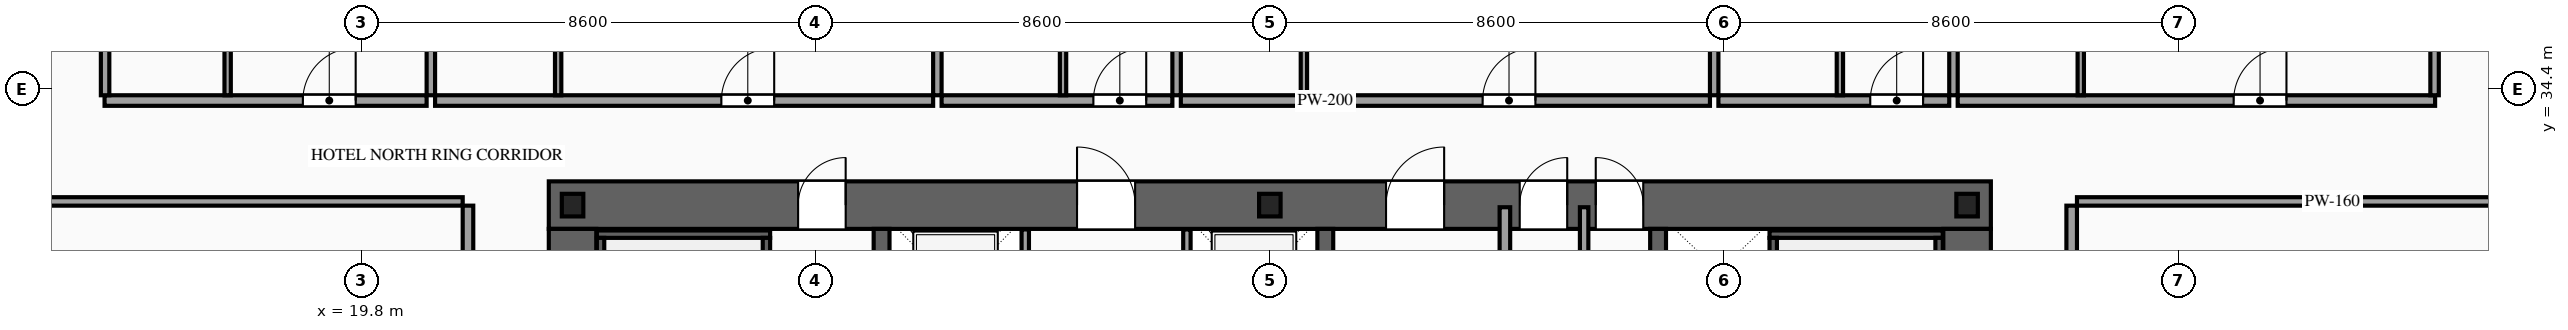
"""IFC4 building model, lengths in metres.
Left out: names, types, materials, properties, quantities, classifications, styles, units other than length and angle.
Written with IfcOpenShell. Run it as: python <this file> out.ifc"""

import sys

from ifc_helpers import new_model, si_unit, direction, frame, frame_2d, origin, origin_2d, place, context, subcontext, project, spatial, rectangle, i_section, extrude, source, transform, mapped, element, fill, save


model = new_model("IFC4")
c1 = context("Model", 3, precision=1e-05, world=origin(), true_north=direction((0.0, 1.0)))
c2 = subcontext(c1, "Body", "Model", "MODEL_VIEW")
j1 = project(units=[si_unit("LENGTHUNIT", "METRE"), si_unit("PLANEANGLEUNIT", "RADIAN")], contexts=[c1])
p1 = place(None, origin())
s1 = spatial("IfcSite", under=j1, at=p1, CompositionType="ELEMENT")
p2 = place(p1, origin())
s2 = spatial("IfcBuilding", under=s1, at=p2, CompositionType="ELEMENT")
p3 = place(p2, frame((0.0, 0.0, 71.2)))
s3 = spatial("IfcBuildingStorey", under=s2, at=p3, CompositionType="ELEMENT", Elevation=71.2)
p4 = place(p3, frame((23.35, 32.2, 0.0), z_axis=(0.0, 0.0, 1.0), x_axis=(1.0, 0.0, 0.0)))
e1 = element("IfcWall", 1, at=p4, inside=s3, PredefinedType="SHEAR", context=c2, shape_type="SweptSolid", body=[
    extrude(rectangle(XDim=27.3, YDim=0.9, at=frame_2d((13.65, 0.0))), origin(), (0.0, 0.0, 1.0), 3.6),
])
p5 = place(p4, frame((4.72, 0.0, 0.0)))
e2 = element("IfcOpeningElement", 2, at=p5, cuts=e1, PredefinedType="OPENING", context=c2, shape_type="SweptSolid", body=[
    extrude(rectangle(XDim=0.9, YDim=2.15, at=frame_2d((0.45, 1.075))), frame((0.0, 0.465, 0.0), z_axis=(0.0, -1.0, 0.0), x_axis=(1.0, 0.0, 0.0)), (0.0, 0.0, 1.0), 0.93),
])
p6 = place(p4, frame((10.0, 0.0, 0.0)))
e3 = element("IfcOpeningElement", 3, at=p6, cuts=e1, PredefinedType="OPENING", context=c2, shape_type="SweptSolid", body=[
    extrude(rectangle(XDim=1.1, YDim=2.2, at=frame_2d((0.55, 1.1))), frame((0.0, 0.465, 0.0), z_axis=(0.0, -1.0, 0.0), x_axis=(1.0, 0.0, 0.0)), (0.0, 0.0, 1.0), 0.93),
])
p7 = place(p4, frame((15.85, 0.0, 0.0)))
e4 = element("IfcOpeningElement", 4, at=p7, cuts=e1, PredefinedType="OPENING", context=c2, shape_type="SweptSolid", body=[
    extrude(rectangle(XDim=1.1, YDim=2.2, at=frame_2d((0.55, 1.1))), frame((0.0, 0.465, 0.0), z_axis=(0.0, -1.0, 0.0), x_axis=(1.0, 0.0, 0.0)), (0.0, 0.0, 1.0), 0.93),
])
p8 = place(p4, frame((18.38, 0.0, 0.0)))
e5 = element("IfcOpeningElement", 5, at=p8, cuts=e1, PredefinedType="OPENING", context=c2, shape_type="SweptSolid", body=[
    extrude(rectangle(XDim=0.9, YDim=2.15, at=frame_2d((0.45, 1.075))), frame((0.0, 0.465, 0.0), z_axis=(0.0, -1.0, 0.0), x_axis=(1.0, 0.0, 0.0)), (0.0, 0.0, 1.0), 0.93),
])
p9 = place(p4, frame((19.82, 0.0, 0.0)))
e6 = element("IfcOpeningElement", 6, at=p9, cuts=e1, PredefinedType="OPENING", context=c2, shape_type="SweptSolid", body=[
    extrude(rectangle(XDim=0.9, YDim=2.15, at=frame_2d((0.45, 1.075))), frame((0.0, 0.465, 0.0), z_axis=(0.0, -1.0, 0.0), x_axis=(1.0, 0.0, 0.0)), (0.0, 0.0, 1.0), 0.93),
])
m1 = source(origin(), c2, "Body", "SweptSolid", [
    extrude(rectangle(XDim=11.9, YDim=0.9, at=frame_2d((5.95, 0.0))), origin(), (0.0, 0.0, 1.0), 3.6),
])
for number, where, z_axis, x_axis in (
    (7, (23.8, 19.85, 0.0), (0.0, 0.0, 1.0), (0.0, 1.0, 0.0)),
    (8, (50.2, 19.85, 0.0), (0.0, 0.0, 1.0), (0.0, 1.0, 0.0)),
):
    element("IfcWall", number, at=place(p3, frame(where, z_axis=z_axis, x_axis=x_axis)), inside=s3, PredefinedType="SHEAR", context=c2, shape_type="MappedRepresentation", body=[
        mapped(m1, transform((0.0, 0.0, 0.0), scale=1.0)),
    ])
m2 = source(origin(), c2, "Body", "SweptSolid", [
    extrude(rectangle(XDim=11.9, YDim=0.3, at=frame_2d((5.95, 0.0))), origin(), (0.0, 0.0, 1.0), 3.6),
])
for number, where, z_axis, x_axis in (
    (9, (29.65, 19.85, 0.0), (0.0, 0.0, 1.0), (0.0, 1.0, 0.0)),
    (10, (38.05, 19.85, 0.0), (0.0, 0.0, 1.0), (0.0, 1.0, 0.0)),
    (11, (44.35, 19.85, 0.0), (0.0, 0.0, 1.0), (0.0, 1.0, 0.0)),
):
    element("IfcWall", number, at=place(p3, frame(where, z_axis=z_axis, x_axis=x_axis)), inside=s3, PredefinedType="SOLIDWALL", context=c2, shape_type="MappedRepresentation", body=[
        mapped(m2, transform((0.0, 0.0, 0.0), scale=1.0)),
    ])
m3 = source(origin(), c2, "Body", "SweptSolid", [
    extrude(i_section(OverallWidth=0.407, OverallDepth=0.428, WebThickness=0.02, FlangeThickness=0.035, at=origin_2d()), origin(), (0.0, 0.0, 1.0), 3.6),
])
for number, where, z_axis, x_axis in (
    (12, (23.8, 32.2, 0.0), (0.0, 0.0, 1.0), (1.0, 0.0, 0.0)),
    (13, (37.0, 32.2, 0.0), (0.0, 0.0, 1.0), (1.0, 0.0, 0.0)),
    (14, (50.2, 32.2, 0.0), (0.0, 0.0, 1.0), (1.0, 0.0, 0.0)),
):
    element("IfcColumn", number, at=place(p3, frame(where, z_axis=z_axis, x_axis=x_axis)), inside=s3, PredefinedType="COLUMN", context=c2, shape_type="MappedRepresentation", body=[
        mapped(m3, transform((0.0, 0.0, 0.0), scale=1.0)),
    ])
p10 = place(p3, frame((32.37, 29.4, 0.0), z_axis=(0.0, 0.0, 1.0), x_axis=(0.0, 1.0, 0.0)))
e15 = element("IfcWall", 15, at=p10, inside=s3, PredefinedType="SOLIDWALL", context=c2, shape_type="SweptSolid", body=[
    extrude(rectangle(XDim=2.34, YDim=0.14, at=frame_2d((1.17, 0.0))), origin(), (0.0, 0.0, 1.0), 3.38),
])
p11 = place(p10, frame((0.62, 0.0, 0.0)))
e16 = element("IfcOpeningElement", 16, at=p11, cuts=e15, PredefinedType="OPENING", context=c2, shape_type="SweptSolid", body=[
    extrude(rectangle(XDim=1.1, YDim=2.2, at=frame_2d((0.55, 1.1))), frame((0.0, 0.085, 0.0), z_axis=(0.0, -1.0, 0.0), x_axis=(1.0, 0.0, 0.0)), (0.0, 0.0, 1.0), 0.17),
])
p12 = place(p3, frame((35.43, 29.4, 0.0), z_axis=(0.0, 0.0, 1.0), x_axis=(0.0, 1.0, 0.0)))
e17 = element("IfcWall", 17, at=p12, inside=s3, PredefinedType="SOLIDWALL", context=c2, shape_type="SweptSolid", body=[
    extrude(rectangle(XDim=2.34, YDim=0.14, at=frame_2d((1.17, 0.0))), origin(), (0.0, 0.0, 1.0), 3.38),
])
p13 = place(p12, frame((0.62, 0.0, 0.0)))
e18 = element("IfcOpeningElement", 18, at=p13, cuts=e17, PredefinedType="OPENING", context=c2, shape_type="SweptSolid", body=[
    extrude(rectangle(XDim=1.1, YDim=2.2, at=frame_2d((0.55, 1.1))), frame((0.0, 0.085, 0.0), z_axis=(0.0, -1.0, 0.0), x_axis=(1.0, 0.0, 0.0)), (0.0, 0.0, 1.0), 0.17),
])
m4 = source(origin(), c2, "Body", "SweptSolid", [
    extrude(rectangle(XDim=3.28, YDim=0.14, at=frame_2d((1.64, 0.0))), origin(), (0.0, 0.0, 1.0), 3.38),
])
p14 = place(p3, frame((24.26, 31.65, 0.0), z_axis=(0.0, 0.0, 1.0), x_axis=(1.0, 0.0, 0.0)))
e19 = element("IfcWall", 19, at=p14, inside=s3, PredefinedType="SOLIDWALL", context=c2, shape_type="MappedRepresentation", body=[
    mapped(m4, transform((0.0, 0.0, 0.0), scale=1.0)),
])
m5 = source(origin(), c2, "Body", "SweptSolid", [
    extrude(rectangle(XDim=8.94, YDim=0.14, at=frame_2d((4.47, 0.0))), origin(), (0.0, 0.0, 1.0), 3.38),
])
for number, where, z_axis, x_axis in (
    (20, (24.33, 22.64, 0.0), (0.0, 0.0, 1.0), (0.0, 1.0, 0.0)),
    (21, (27.47, 22.64, 0.0), (0.0, 0.0, 1.0), (0.0, 1.0, 0.0)),
):
    element("IfcWall", number, at=place(p3, frame(where, z_axis=z_axis, x_axis=x_axis)), inside=s3, PredefinedType="SOLIDWALL", context=c2, shape_type="MappedRepresentation", body=[
        mapped(m5, transform((0.0, 0.0, 0.0), scale=1.0)),
    ])
p15 = place(p3, frame((46.46, 31.65, 0.0), z_axis=(0.0, 0.0, 1.0), x_axis=(1.0, 0.0, 0.0)))
e22 = element("IfcWall", 22, at=p15, inside=s3, PredefinedType="SOLIDWALL", context=c2, shape_type="MappedRepresentation", body=[
    mapped(m4, transform((0.0, 0.0, 0.0), scale=1.0)),
])
for number, where, z_axis, x_axis in (
    (23, (46.53, 22.64, 0.0), (0.0, 0.0, 1.0), (0.0, 1.0, 0.0)),
    (24, (49.67, 22.64, 0.0), (0.0, 0.0, 1.0), (0.0, 1.0, 0.0)),
):
    element("IfcWall", number, at=place(p3, frame(where, z_axis=z_axis, x_axis=x_axis)), inside=s3, PredefinedType="SOLIDWALL", context=c2, shape_type="MappedRepresentation", body=[
        mapped(m5, transform((0.0, 0.0, 0.0), scale=1.0)),
    ])
m6 = source(origin(), c2, "Body", "SweptSolid", [
    extrude(rectangle(XDim=5.96, YDim=0.2, at=frame_2d((2.98, 0.0))), origin(), (0.0, 0.0, 1.0), 3.38),
])
p16 = place(p3, frame((41.45, 26.2, 0.0), z_axis=(0.0, 0.0, 1.0), x_axis=(0.0, 1.0, 0.0)))
e25 = element("IfcWall", 25, at=p16, inside=s3, PredefinedType="PARTITIONING", context=c2, shape_type="MappedRepresentation", body=[
    mapped(m6, transform((0.0, 0.0, 0.0), scale=1.0)),
])
m7 = source(origin(), c2, "Body", "SweptSolid", [
    extrude(rectangle(XDim=5.96, YDim=0.16, at=frame_2d((2.98, 0.0))), origin(), (0.0, 0.0, 1.0), 3.38),
])
p17 = place(p3, frame((42.95, 26.2, 0.0), z_axis=(0.0, 0.0, 1.0), x_axis=(0.0, 1.0, 0.0)))
e26 = element("IfcWall", 26, at=p17, inside=s3, PredefinedType="PARTITIONING", context=c2, shape_type="MappedRepresentation", body=[
    mapped(m7, transform((0.0, 0.0, 0.0), scale=1.0)),
])
p18 = place(p3, frame((14.94, 34.18, 0.0), z_axis=(0.0, 0.0, 1.0), x_axis=(1.0, 0.0, 0.0)))
e27 = element("IfcWall", 27, at=p18, inside=s3, PredefinedType="PARTITIONING", context=c2, shape_type="SweptSolid", body=[
    extrude(rectangle(XDim=6.097, YDim=0.2, at=frame_2d((3.049, 0.0))), origin(), (0.0, 0.0, 1.0), 3.38),
])
p19 = place(p18, frame((3.754, 0.0, 0.0)))
e28 = element("IfcOpeningElement", 28, at=p19, cuts=e27, PredefinedType="OPENING", context=c2, shape_type="SweptSolid", body=[
    extrude(rectangle(XDim=1.0, YDim=2.2, at=frame_2d((0.5, 1.1))), frame((0.0, 0.115, 0.0), z_axis=(0.0, -1.0, 0.0), x_axis=(1.0, 0.0, 0.0)), (0.0, 0.0, 1.0), 0.23),
])
m8 = source(origin(), c2, "Body", "SweptSolid", [
    extrude(rectangle(XDim=16.47, YDim=0.16, at=frame_2d((8.235, 0.0))), origin(), (0.0, 0.0, 1.0), 3.38),
])
p20 = place(p3, frame((21.117, 34.28, 0.0), z_axis=(0.0, 0.0, 1.0), x_axis=(0.0, 1.0, 0.0)))
e29 = element("IfcWall", 29, at=p20, inside=s3, PredefinedType="PARTITIONING", context=c2, shape_type="MappedRepresentation", body=[
    mapped(m8, transform((0.0, 0.0, 0.0), scale=1.0)),
])
m9 = source(origin(), c2, "Body", "SweptSolid", [
    extrude(rectangle(XDim=2.42, YDim=0.12, at=frame_2d((1.21, 0.0))), origin(), (0.0, 0.0, 1.0), 3.38),
])
p21 = place(p3, frame((17.27, 34.28, 0.0), z_axis=(0.0, 0.0, 1.0), x_axis=(0.0, 1.0, 0.0)))
e30 = element("IfcWall", 30, at=p21, inside=s3, PredefinedType="PARTITIONING", context=c2, shape_type="MappedRepresentation", body=[
    mapped(m9, transform((0.0, 0.0, 0.0), scale=1.0)),
])
p22 = place(p3, frame((21.197, 34.18, 0.0), z_axis=(0.0, 0.0, 1.0), x_axis=(1.0, 0.0, 0.0)))
e31 = element("IfcWall", 31, at=p22, inside=s3, PredefinedType="PARTITIONING", context=c2, shape_type="SweptSolid", body=[
    extrude(rectangle(XDim=9.429, YDim=0.2, at=frame_2d((4.714, 0.0))), origin(), (0.0, 0.0, 1.0), 3.38),
])
p23 = place(p22, frame((5.42, 0.0, 0.0)))
e32 = element("IfcOpeningElement", 32, at=p23, cuts=e31, PredefinedType="OPENING", context=c2, shape_type="SweptSolid", body=[
    extrude(rectangle(XDim=1.0, YDim=2.2, at=frame_2d((0.5, 1.1))), frame((0.0, 0.115, 0.0), z_axis=(0.0, -1.0, 0.0), x_axis=(1.0, 0.0, 0.0)), (0.0, 0.0, 1.0), 0.23),
])
p24 = place(p3, frame((30.706, 34.28, 0.0), z_axis=(0.0, 0.0, 1.0), x_axis=(0.0, 1.0, 0.0)))
e33 = element("IfcWall", 33, at=p24, inside=s3, PredefinedType="PARTITIONING", context=c2, shape_type="MappedRepresentation", body=[
    mapped(m8, transform((0.0, 0.0, 0.0), scale=1.0)),
])
p25 = place(p3, frame((23.527, 34.28, 0.0), z_axis=(0.0, 0.0, 1.0), x_axis=(0.0, 1.0, 0.0)))
e34 = element("IfcWall", 34, at=p25, inside=s3, PredefinedType="PARTITIONING", context=c2, shape_type="MappedRepresentation", body=[
    mapped(m9, transform((0.0, 0.0, 0.0), scale=1.0)),
])
p26 = place(p3, frame((30.786, 34.18, 0.0), z_axis=(0.0, 0.0, 1.0), x_axis=(1.0, 0.0, 0.0)))
e35 = element("IfcWall", 35, at=p26, inside=s3, PredefinedType="PARTITIONING", context=c2, shape_type="SweptSolid", body=[
    extrude(rectangle(XDim=4.369, YDim=0.2, at=frame_2d((2.185, 0.0))), origin(), (0.0, 0.0, 1.0), 3.38),
])
p27 = place(p26, frame((2.874, 0.0, 0.0)))
e36 = element("IfcOpeningElement", 36, at=p27, cuts=e35, PredefinedType="OPENING", context=c2, shape_type="SweptSolid", body=[
    extrude(rectangle(XDim=1.0, YDim=2.2, at=frame_2d((0.5, 1.1))), frame((0.0, 0.115, 0.0), z_axis=(0.0, -1.0, 0.0), x_axis=(1.0, 0.0, 0.0)), (0.0, 0.0, 1.0), 0.23),
])
p28 = place(p3, frame((35.235, 34.28, 0.0), z_axis=(0.0, 0.0, 1.0), x_axis=(0.0, 1.0, 0.0)))
e37 = element("IfcWall", 37, at=p28, inside=s3, PredefinedType="PARTITIONING", context=c2, shape_type="MappedRepresentation", body=[
    mapped(m8, transform((0.0, 0.0, 0.0), scale=1.0)),
])
p29 = place(p3, frame((33.085, 34.28, 0.0), z_axis=(0.0, 0.0, 1.0), x_axis=(0.0, 1.0, 0.0)))
e38 = element("IfcWall", 38, at=p29, inside=s3, PredefinedType="PARTITIONING", context=c2, shape_type="MappedRepresentation", body=[
    mapped(m9, transform((0.0, 0.0, 0.0), scale=1.0)),
])
p30 = place(p3, frame((35.315, 34.18, 0.0), z_axis=(0.0, 0.0, 1.0), x_axis=(1.0, 0.0, 0.0)))
e39 = element("IfcWall", 39, at=p30, inside=s3, PredefinedType="PARTITIONING", context=c2, shape_type="SweptSolid", body=[
    extrude(rectangle(XDim=10.017, YDim=0.2, at=frame_2d((5.009, 0.0))), origin(), (0.0, 0.0, 1.0), 3.38),
])
p31 = place(p30, frame((5.713, 0.0, 0.0)))
e40 = element("IfcOpeningElement", 40, at=p31, cuts=e39, PredefinedType="OPENING", context=c2, shape_type="SweptSolid", body=[
    extrude(rectangle(XDim=1.0, YDim=2.2, at=frame_2d((0.5, 1.1))), frame((0.0, 0.115, 0.0), z_axis=(0.0, -1.0, 0.0), x_axis=(1.0, 0.0, 0.0)), (0.0, 0.0, 1.0), 0.23),
])
p32 = place(p3, frame((45.412, 34.28, 0.0), z_axis=(0.0, 0.0, 1.0), x_axis=(0.0, 1.0, 0.0)))
e41 = element("IfcWall", 41, at=p32, inside=s3, PredefinedType="PARTITIONING", context=c2, shape_type="MappedRepresentation", body=[
    mapped(m8, transform((0.0, 0.0, 0.0), scale=1.0)),
])
p33 = place(p3, frame((37.645, 34.28, 0.0), z_axis=(0.0, 0.0, 1.0), x_axis=(0.0, 1.0, 0.0)))
e42 = element("IfcWall", 42, at=p33, inside=s3, PredefinedType="PARTITIONING", context=c2, shape_type="MappedRepresentation", body=[
    mapped(m9, transform((0.0, 0.0, 0.0), scale=1.0)),
])
p34 = place(p3, frame((45.492, 34.18, 0.0), z_axis=(0.0, 0.0, 1.0), x_axis=(1.0, 0.0, 0.0)))
e43 = element("IfcWall", 43, at=p34, inside=s3, PredefinedType="PARTITIONING", context=c2, shape_type="SweptSolid", body=[
    extrude(rectangle(XDim=4.37, YDim=0.2, at=frame_2d((2.185, 0.0))), origin(), (0.0, 0.0, 1.0), 3.38),
])
p35 = place(p34, frame((2.875, 0.0, 0.0)))
e44 = element("IfcOpeningElement", 44, at=p35, cuts=e43, PredefinedType="OPENING", context=c2, shape_type="SweptSolid", body=[
    extrude(rectangle(XDim=1.0, YDim=2.2, at=frame_2d((0.5, 1.1))), frame((0.0, 0.115, 0.0), z_axis=(0.0, -1.0, 0.0), x_axis=(1.0, 0.0, 0.0)), (0.0, 0.0, 1.0), 0.23),
])
p36 = place(p3, frame((49.942, 34.28, 0.0), z_axis=(0.0, 0.0, 1.0), x_axis=(0.0, 1.0, 0.0)))
e45 = element("IfcWall", 45, at=p36, inside=s3, PredefinedType="PARTITIONING", context=c2, shape_type="MappedRepresentation", body=[
    mapped(m8, transform((0.0, 0.0, 0.0), scale=1.0)),
])
p37 = place(p3, frame((47.792, 34.28, 0.0), z_axis=(0.0, 0.0, 1.0), x_axis=(0.0, 1.0, 0.0)))
e46 = element("IfcWall", 46, at=p37, inside=s3, PredefinedType="PARTITIONING", context=c2, shape_type="MappedRepresentation", body=[
    mapped(m9, transform((0.0, 0.0, 0.0), scale=1.0)),
])
p38 = place(p3, frame((50.022, 34.18, 0.0), z_axis=(0.0, 0.0, 1.0), x_axis=(1.0, 0.0, 0.0)))
e47 = element("IfcWall", 47, at=p38, inside=s3, PredefinedType="PARTITIONING", context=c2, shape_type="SweptSolid", body=[
    extrude(rectangle(XDim=9.038, YDim=0.2, at=frame_2d((4.519, 0.0))), origin(), (0.0, 0.0, 1.0), 3.38),
])
p39 = place(p38, frame((5.224, 0.0, 0.0)))
e48 = element("IfcOpeningElement", 48, at=p39, cuts=e47, PredefinedType="OPENING", context=c2, shape_type="SweptSolid", body=[
    extrude(rectangle(XDim=1.0, YDim=2.2, at=frame_2d((0.5, 1.1))), frame((0.0, 0.115, 0.0), z_axis=(0.0, -1.0, 0.0), x_axis=(1.0, 0.0, 0.0)), (0.0, 0.0, 1.0), 0.23),
])
m10 = source(origin(), c2, "Body", "SweptSolid", [
    extrude(rectangle(XDim=16.32, YDim=0.16, at=frame_2d((8.16, 0.0))), origin(), (0.0, 0.0, 1.0), 3.38),
])
for number, where, z_axis, x_axis in (
    (49, (14.95, 34.28, 0.0), (0.0, 0.0, 1.0), (0.0, 1.0, 0.0)),
    (50, (59.05, 34.28, 0.0), (0.0, 0.0, 1.0), (0.0, 1.0, 0.0)),
):
    element("IfcWall", number, at=place(p3, frame(where, z_axis=z_axis, x_axis=x_axis)), inside=s3, PredefinedType="PARTITIONING", context=c2, shape_type="MappedRepresentation", body=[
        mapped(m10, transform((0.0, 0.0, 0.0), scale=1.0)),
    ])
p40 = place(p3, frame((52.352, 34.28, 0.0), z_axis=(0.0, 0.0, 1.0), x_axis=(0.0, 1.0, 0.0)))
e51 = element("IfcWall", 51, at=p40, inside=s3, PredefinedType="PARTITIONING", context=c2, shape_type="MappedRepresentation", body=[
    mapped(m9, transform((0.0, 0.0, 0.0), scale=1.0)),
])
p41 = place(p3, frame((21.82, 25.88, 0.0), z_axis=(0.0, 0.0, 1.0), x_axis=(0.0, 1.0, 0.0)))
e52 = element("IfcWall", 52, at=p41, inside=s3, PredefinedType="PARTITIONING", context=c2, shape_type="SweptSolid", body=[
    extrude(rectangle(XDim=6.31, YDim=0.2, at=frame_2d((3.155, 0.0))), origin(), (0.0, 0.0, 1.0), 3.38),
])
p42 = place(p41, frame((2.655, 0.0, 0.0)))
e53 = element("IfcOpeningElement", 53, at=p42, cuts=e52, PredefinedType="OPENING", context=c2, shape_type="SweptSolid", body=[
    extrude(rectangle(XDim=1.0, YDim=2.2, at=frame_2d((0.5, 1.1))), frame((0.0, 0.115, 0.0), z_axis=(0.0, -1.0, 0.0), x_axis=(1.0, 0.0, 0.0)), (0.0, 0.0, 1.0), 0.23),
])
m11 = source(origin(), c2, "Body", "SweptSolid", [
    extrude(rectangle(XDim=9.67, YDim=0.16, at=frame_2d((4.835, 0.0))), origin(), (0.0, 0.0, 1.0), 2.875),
])
p43 = place(p3, frame((12.05, 32.27, 0.0), z_axis=(0.0, 0.0, 1.0), x_axis=(1.0, 0.0, 0.0)))
e54 = element("IfcWall", 54, at=p43, inside=s3, PredefinedType="PARTITIONING", context=c2, shape_type="MappedRepresentation", body=[
    mapped(m11, transform((0.0, 0.0, 0.0), scale=1.0)),
])
p44 = place(p3, frame((52.18, 25.88, 0.0), z_axis=(0.0, 0.0, 1.0), x_axis=(0.0, 1.0, 0.0)))
e55 = element("IfcWall", 55, at=p44, inside=s3, PredefinedType="PARTITIONING", context=c2, shape_type="SweptSolid", body=[
    extrude(rectangle(XDim=6.31, YDim=0.2, at=frame_2d((3.155, 0.0))), origin(), (0.0, 0.0, 1.0), 3.38),
])
p45 = place(p44, frame((2.655, 0.0, 0.0)))
e56 = element("IfcOpeningElement", 56, at=p45, cuts=e55, PredefinedType="OPENING", context=c2, shape_type="SweptSolid", body=[
    extrude(rectangle(XDim=1.0, YDim=2.2, at=frame_2d((0.5, 1.1))), frame((0.0, 0.115, 0.0), z_axis=(0.0, -1.0, 0.0), x_axis=(1.0, 0.0, 0.0)), (0.0, 0.0, 1.0), 0.23),
])
p46 = place(p3, frame((52.28, 32.27, 0.0), z_axis=(0.0, 0.0, 1.0), x_axis=(1.0, 0.0, 0.0)))
e57 = element("IfcWall", 57, at=p46, inside=s3, PredefinedType="PARTITIONING", context=c2, shape_type="MappedRepresentation", body=[
    mapped(m11, transform((0.0, 0.0, 0.0), scale=1.0)),
])
m12 = source(origin(), c2, "Body", "SweptSolid", [
    extrude(rectangle(XDim=0.9, YDim=2.15, at=frame_2d((0.45, 1.075))), frame((0.0, 0.025, 0.0), z_axis=(0.0, -1.0, 0.0), x_axis=(1.0, 0.0, 0.0)), (0.0, 0.0, 1.0), 0.05),
])
p47 = place(p5, origin())
e58 = element("IfcDoor", 58, at=p47, inside=s3, OperationType="SINGLE_SWING_RIGHT", PredefinedType="DOOR", context=c2, shape_type="MappedRepresentation", body=[
    mapped(m12, transform((0.0, 0.0, 0.0), scale=1.0)),
])
fill(e2, e58)
m13 = source(origin(), c2, "Body", "SweptSolid", [
    extrude(rectangle(XDim=1.1, YDim=2.2, at=frame_2d((0.55, 1.1))), frame((0.0, 0.025, 0.0), z_axis=(0.0, -1.0, 0.0), x_axis=(1.0, 0.0, 0.0)), (0.0, 0.0, 1.0), 0.05),
])
p48 = place(p6, origin())
e59 = element("IfcDoor", 59, at=p48, inside=s3, OperationType="SINGLE_SWING_LEFT", PredefinedType="DOOR", context=c2, shape_type="MappedRepresentation", body=[
    mapped(m13, transform((0.0, 0.0, 0.0), scale=1.0)),
])
fill(e3, e59)
p49 = place(p7, origin())
e60 = element("IfcDoor", 60, at=p49, inside=s3, OperationType="SINGLE_SWING_RIGHT", PredefinedType="DOOR", context=c2, shape_type="MappedRepresentation", body=[
    mapped(m13, transform((0.0, 0.0, 0.0), scale=1.0)),
])
fill(e4, e60)
p50 = place(p8, origin())
e61 = element("IfcDoor", 61, at=p50, inside=s3, OperationType="SINGLE_SWING_RIGHT", PredefinedType="DOOR", context=c2, shape_type="MappedRepresentation", body=[
    mapped(m12, transform((0.0, 0.0, 0.0), scale=1.0)),
])
fill(e5, e61)
p51 = place(p9, origin())
e62 = element("IfcDoor", 62, at=p51, inside=s3, OperationType="SINGLE_SWING_LEFT", PredefinedType="DOOR", context=c2, shape_type="MappedRepresentation", body=[
    mapped(m12, transform((0.0, 0.0, 0.0), scale=1.0)),
])
fill(e6, e62)
m14 = source(origin(), c2, "Body", "SweptSolid", [
    extrude(rectangle(XDim=1.0, YDim=2.2, at=frame_2d((0.5, 1.1))), frame((0.0, 0.025, 0.0), z_axis=(0.0, -1.0, 0.0), x_axis=(1.0, 0.0, 0.0)), (0.0, 0.0, 1.0), 0.05),
])
p52 = place(p19, origin())
e63 = element("IfcDoor", 63, at=p52, inside=s3, OperationType="SINGLE_SWING_RIGHT", PredefinedType="DOOR", context=c2, shape_type="MappedRepresentation", body=[
    mapped(m14, transform((0.0, 0.0, 0.0), scale=1.0)),
])
fill(e28, e63)
p53 = place(p23, origin())
e64 = element("IfcDoor", 64, at=p53, inside=s3, OperationType="SINGLE_SWING_RIGHT", PredefinedType="DOOR", context=c2, shape_type="MappedRepresentation", body=[
    mapped(m14, transform((0.0, 0.0, 0.0), scale=1.0)),
])
fill(e32, e64)
p54 = place(p27, origin())
e65 = element("IfcDoor", 65, at=p54, inside=s3, OperationType="SINGLE_SWING_RIGHT", PredefinedType="DOOR", context=c2, shape_type="MappedRepresentation", body=[
    mapped(m14, transform((0.0, 0.0, 0.0), scale=1.0)),
])
fill(e36, e65)
p55 = place(p31, origin())
e66 = element("IfcDoor", 66, at=p55, inside=s3, OperationType="SINGLE_SWING_RIGHT", PredefinedType="DOOR", context=c2, shape_type="MappedRepresentation", body=[
    mapped(m14, transform((0.0, 0.0, 0.0), scale=1.0)),
])
fill(e40, e66)
p56 = place(p35, origin())
e67 = element("IfcDoor", 67, at=p56, inside=s3, OperationType="SINGLE_SWING_RIGHT", PredefinedType="DOOR", context=c2, shape_type="MappedRepresentation", body=[
    mapped(m14, transform((0.0, 0.0, 0.0), scale=1.0)),
])
fill(e44, e67)
p57 = place(p39, origin())
e68 = element("IfcDoor", 68, at=p57, inside=s3, OperationType="SINGLE_SWING_RIGHT", PredefinedType="DOOR", context=c2, shape_type="MappedRepresentation", body=[
    mapped(m14, transform((0.0, 0.0, 0.0), scale=1.0)),
])
fill(e48, e68)
save(model, sys.argv[1])
